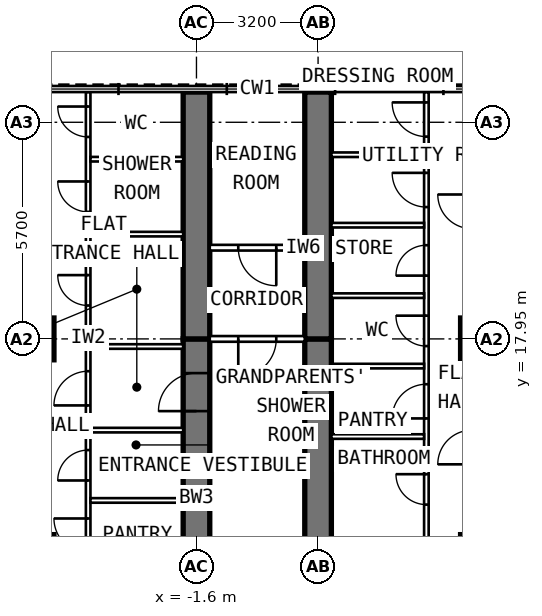
"""IFC4 building model, lengths in metres.
Left out: names, types, materials, properties, quantities, classifications, styles, units other than length and angle.
Written with IfcOpenShell. Run it as: python <this file> out.ifc"""

import sys

from ifc_helpers import new_model, si_unit, direction, frame, frame_2d, origin, origin_2d, place, context, subcontext, project, spatial, rectangle, extrude, element, fill, save


model = new_model("IFC4")
c1 = context("Model", 3, precision=1e-05, world=origin(), true_north=direction((0.0, 1.0)))
c2 = subcontext(c1, "Body", "Model", "MODEL_VIEW")
j1 = project(units=[si_unit("LENGTHUNIT", "METRE"), si_unit("PLANEANGLEUNIT", "RADIAN")], contexts=[c1])
p1 = place(None, origin())
s1 = spatial("IfcSite", under=j1, at=p1, CompositionType="ELEMENT")
p2 = place(p1, origin())
s2 = spatial("IfcBuilding", under=s1, at=p2, CompositionType="ELEMENT")
p3 = place(p2, frame((0.0, 0.0, 246.0)))
s3 = spatial("IfcBuildingStorey", under=s2, at=p3, CompositionType="ELEMENT", Elevation=246.0)
for number, where, z_axis, x_axis in (
    (1, (-5.9, 12.25, 0.0), (0.0, 0.0, 1.0), (0.0, 1.0, 0.0)),
    (2, (-5.9, 17.95, 0.0), (0.0, 0.0, 1.0), (0.0, 1.0, 0.0)),
    (3, (5.9, 12.25, 0.0), (0.0, 0.0, 1.0), (0.0, 1.0, 0.0)),
    (4, (5.9, 17.95, 0.0), (0.0, 0.0, 1.0), (0.0, 1.0, 0.0)),
):
    element("IfcColumn", number, at=place(p3, frame(where, z_axis=z_axis, x_axis=x_axis)), inside=s3, PredefinedType="COLUMN", context=c2, shape_type="SweptSolid", body=[
        extrude(rectangle(XDim=1.1, YDim=1.1, at=origin_2d()), origin(), (0.0, 0.0, 1.0), 3.6),
    ])
p4 = place(p3, frame((-1.6, 9.6, 0.0), z_axis=(0.0, 0.0, 1.0), x_axis=(0.0, 1.0, 0.0)))
e5 = element("IfcWall", 5, at=p4, inside=s3, PredefinedType="SHEAR", context=c2, shape_type="SweptSolid", body=[
    extrude(rectangle(XDim=8.35, YDim=0.7, at=frame_2d((4.175, 0.0))), origin(), (0.0, 0.0, 1.0), 3.6),
])
p5 = place(p4, frame((6.45, 0.0, 0.0)))
e6 = element("IfcOpeningElement", 6, at=p5, cuts=e5, PredefinedType="OPENING", context=c2, shape_type="SweptSolid", body=[
    extrude(rectangle(XDim=1.0, YDim=2.1, at=frame_2d((0.5, 1.05))), frame((0.0, 0.362, 0.0), z_axis=(0.0, -1.0, 0.0), x_axis=(1.0, 0.0, 0.0)), (0.0, 0.0, 1.0), 0.724),
])
p6 = place(p3, frame((-1.6, 17.95, 0.0), z_axis=(0.0, 0.0, 1.0), x_axis=(0.0, 1.0, 0.0)))
e7 = element("IfcWall", 7, at=p6, inside=s3, PredefinedType="SHEAR", context=c2, shape_type="SweptSolid", body=[
    extrude(rectangle(XDim=6.495, YDim=0.7, at=frame_2d((3.248, 0.0))), origin(), (0.0, 0.0, 1.0), 3.6),
])
p7 = place(p3, frame((1.6, 9.6, 0.0), z_axis=(0.0, 0.0, 1.0), x_axis=(0.0, 1.0, 0.0)))
e8 = element("IfcWall", 8, at=p7, inside=s3, PredefinedType="SHEAR", context=c2, shape_type="SweptSolid", body=[
    extrude(rectangle(XDim=8.35, YDim=0.7, at=frame_2d((4.175, 0.0))), origin(), (0.0, 0.0, 1.0), 3.6),
])
p8 = place(p7, frame((1.3, 0.0, 0.0)))
e9 = element("IfcOpeningElement", 9, at=p8, cuts=e8, PredefinedType="OPENING", context=c2, shape_type="SweptSolid", body=[
    extrude(rectangle(XDim=1.0, YDim=2.1, at=frame_2d((0.5, 1.05))), frame((0.0, 0.362, 0.0), z_axis=(0.0, -1.0, 0.0), x_axis=(1.0, 0.0, 0.0)), (0.0, 0.0, 1.0), 0.724),
])
p9 = place(p3, frame((1.6, 17.95, 0.0), z_axis=(0.0, 0.0, 1.0), x_axis=(0.0, 1.0, 0.0)))
e10 = element("IfcWall", 10, at=p9, inside=s3, PredefinedType="SHEAR", context=c2, shape_type="SweptSolid", body=[
    extrude(rectangle(XDim=6.495, YDim=0.7, at=frame_2d((3.248, 0.0))), origin(), (0.0, 0.0, 1.0), 3.6),
])
p10 = place(p3, frame((-4.45, 9.9, 0.0), z_axis=(0.0, 0.0, 1.0), x_axis=(0.0, 1.0, 0.0)))
e11 = element("IfcWall", 11, at=p10, inside=s3, PredefinedType="PARTITIONING", context=c2, shape_type="SweptSolid", body=[
    extrude(rectangle(XDim=14.545, YDim=0.12, at=frame_2d((7.272, 0.0))), origin(), (0.0, 0.0, 1.0), 3.35),
])
p11 = place(p10, frame((0.625, 0.0, 0.0)))
e12 = element("IfcOpeningElement", 12, at=p11, cuts=e11, PredefinedType="OPENING", context=c2, shape_type="SweptSolid", body=[
    extrude(rectangle(XDim=0.8, YDim=2.1, at=frame_2d((0.4, 1.05))), frame((0.0, 0.072, 0.0), z_axis=(0.0, -1.0, 0.0), x_axis=(1.0, 0.0, 0.0)), (0.0, 0.0, 1.0), 0.144),
])
p12 = place(p10, frame((2.425, 0.0, 0.0)))
e13 = element("IfcOpeningElement", 13, at=p12, cuts=e11, PredefinedType="OPENING", context=c2, shape_type="SweptSolid", body=[
    extrude(rectangle(XDim=0.9, YDim=2.1, at=frame_2d((0.45, 1.05))), frame((0.0, 0.072, 0.0), z_axis=(0.0, -1.0, 0.0), x_axis=(1.0, 0.0, 0.0)), (0.0, 0.0, 1.0), 0.144),
])
p13 = place(p10, frame((4.325, 0.0, 0.0)))
e14 = element("IfcOpeningElement", 14, at=p13, cuts=e11, PredefinedType="OPENING", context=c2, shape_type="SweptSolid", body=[
    extrude(rectangle(XDim=0.8, YDim=2.1, at=frame_2d((0.4, 1.05))), frame((0.0, 0.072, 0.0), z_axis=(0.0, -1.0, 0.0), x_axis=(1.0, 0.0, 0.0)), (0.0, 0.0, 1.0), 0.144),
])
p14 = place(p10, frame((6.3, 0.0, 0.0)))
e15 = element("IfcOpeningElement", 15, at=p14, cuts=e11, PredefinedType="OPENING", context=c2, shape_type="SweptSolid", body=[
    extrude(rectangle(XDim=0.9, YDim=2.1, at=frame_2d((0.45, 1.05))), frame((0.0, 0.072, 0.0), z_axis=(0.0, -1.0, 0.0), x_axis=(1.0, 0.0, 0.0)), (0.0, 0.0, 1.0), 0.144),
])
p15 = place(p10, frame((8.928, 0.0, 0.0)))
e16 = element("IfcOpeningElement", 16, at=p15, cuts=e11, PredefinedType="OPENING", context=c2, shape_type="SweptSolid", body=[
    extrude(rectangle(XDim=0.8, YDim=2.1, at=frame_2d((0.4, 1.05))), frame((0.0, 0.072, 0.0), z_axis=(0.0, -1.0, 0.0), x_axis=(1.0, 0.0, 0.0)), (0.0, 0.0, 1.0), 0.144),
])
p16 = place(p10, frame((11.393, 0.0, 0.0)))
e17 = element("IfcOpeningElement", 17, at=p16, cuts=e11, PredefinedType="OPENING", context=c2, shape_type="SweptSolid", body=[
    extrude(rectangle(XDim=0.8, YDim=2.1, at=frame_2d((0.4, 1.05))), frame((0.0, 0.072, 0.0), z_axis=(0.0, -1.0, 0.0), x_axis=(1.0, 0.0, 0.0)), (0.0, 0.0, 1.0), 0.144),
])
p17 = place(p10, frame((13.364, 0.0, 0.0)))
e18 = element("IfcOpeningElement", 18, at=p17, cuts=e11, PredefinedType="OPENING", context=c2, shape_type="SweptSolid", body=[
    extrude(rectangle(XDim=0.8, YDim=2.1, at=frame_2d((0.4, 1.05))), frame((0.0, 0.072, 0.0), z_axis=(0.0, -1.0, 0.0), x_axis=(1.0, 0.0, 0.0)), (0.0, 0.0, 1.0), 0.144),
])
for number, where, z_axis, x_axis in (
    (19, (-1.95, 13.7, 0.0), (0.0, 0.0, 1.0), (-1.0, 0.0, 0.0)),
    (20, (-1.95, 15.55, 0.0), (0.0, 0.0, 1.0), (-1.0, 0.0, 0.0)),
):
    element("IfcWall", number, at=place(p3, frame(where, z_axis=z_axis, x_axis=x_axis)), inside=s3, PredefinedType="PARTITIONING", context=c2, shape_type="SweptSolid", body=[
        extrude(rectangle(XDim=2.44, YDim=0.12, at=frame_2d((1.22, 0.0))), origin(), (0.0, 0.0, 1.0), 3.35),
    ])
p18 = place(p3, frame((-1.95, 17.75, 0.0), z_axis=(0.0, 0.0, 1.0), x_axis=(-1.0, 0.0, 0.0)))
e21 = element("IfcWall", 21, at=p18, inside=s3, PredefinedType="PARTITIONING", context=c2, shape_type="SweptSolid", body=[
    extrude(rectangle(XDim=2.44, YDim=0.12, at=frame_2d((1.22, 0.0))), origin(), (0.0, 0.0, 1.0), 2.45),
])
for number, where, z_axis, x_axis in (
    (22, (-1.95, 20.707, 0.0), (0.0, 0.0, 1.0), (-1.0, 0.0, 0.0)),
    (23, (-1.95, 22.678, 0.0), (0.0, 0.0, 1.0), (-1.0, 0.0, 0.0)),
):
    element("IfcWall", number, at=place(p3, frame(where, z_axis=z_axis, x_axis=x_axis)), inside=s3, PredefinedType="PARTITIONING", context=c2, shape_type="SweptSolid", body=[
        extrude(rectangle(XDim=2.44, YDim=0.12, at=frame_2d((1.22, 0.0))), origin(), (0.0, 0.0, 1.0), 3.35),
    ])
p19 = place(p3, frame((4.45, 9.9, 0.0), z_axis=(0.0, 0.0, 1.0), x_axis=(0.0, 1.0, 0.0)))
e24 = element("IfcWall", 24, at=p19, inside=s3, PredefinedType="PARTITIONING", context=c2, shape_type="SweptSolid", body=[
    extrude(rectangle(XDim=14.545, YDim=0.12, at=frame_2d((7.272, 0.0))), origin(), (0.0, 0.0, 1.0), 3.35),
])
p20 = place(p19, frame((0.95, 0.0, 0.0)))
e25 = element("IfcOpeningElement", 25, at=p20, cuts=e24, PredefinedType="OPENING", context=c2, shape_type="SweptSolid", body=[
    extrude(rectangle(XDim=0.9, YDim=2.1, at=frame_2d((0.45, 1.05))), frame((0.0, 0.072, 0.0), z_axis=(0.0, -1.0, 0.0), x_axis=(1.0, 0.0, 0.0)), (0.0, 0.0, 1.0), 0.144),
])
p21 = place(p19, frame((3.69, 0.0, 0.0)))
e26 = element("IfcOpeningElement", 26, at=p21, cuts=e24, PredefinedType="OPENING", context=c2, shape_type="SweptSolid", body=[
    extrude(rectangle(XDim=0.8, YDim=2.1, at=frame_2d((0.4, 1.05))), frame((0.0, 0.072, 0.0), z_axis=(0.0, -1.0, 0.0), x_axis=(1.0, 0.0, 0.0)), (0.0, 0.0, 1.0), 0.144),
])
p22 = place(p19, frame((5.958, 0.0, 0.0)))
e27 = element("IfcOpeningElement", 27, at=p22, cuts=e24, PredefinedType="OPENING", context=c2, shape_type="SweptSolid", body=[
    extrude(rectangle(XDim=0.9, YDim=2.1, at=frame_2d((0.45, 1.05))), frame((0.0, 0.072, 0.0), z_axis=(0.0, -1.0, 0.0), x_axis=(1.0, 0.0, 0.0)), (0.0, 0.0, 1.0), 0.144),
])
p23 = place(p19, frame((7.862, 0.0, 0.0)))
e28 = element("IfcOpeningElement", 28, at=p23, cuts=e24, PredefinedType="OPENING", context=c2, shape_type="SweptSolid", body=[
    extrude(rectangle(XDim=0.8, YDim=2.1, at=frame_2d((0.4, 1.05))), frame((0.0, 0.072, 0.0), z_axis=(0.0, -1.0, 0.0), x_axis=(1.0, 0.0, 0.0)), (0.0, 0.0, 1.0), 0.144),
])
p24 = place(p19, frame((9.715, 0.0, 0.0)))
e29 = element("IfcOpeningElement", 29, at=p24, cuts=e24, PredefinedType="OPENING", context=c2, shape_type="SweptSolid", body=[
    extrude(rectangle(XDim=0.8, YDim=2.1, at=frame_2d((0.4, 1.05))), frame((0.0, 0.072, 0.0), z_axis=(0.0, -1.0, 0.0), x_axis=(1.0, 0.0, 0.0)), (0.0, 0.0, 1.0), 0.144),
])
p25 = place(p19, frame((11.519, 0.0, 0.0)))
e30 = element("IfcOpeningElement", 30, at=p25, cuts=e24, PredefinedType="OPENING", context=c2, shape_type="SweptSolid", body=[
    extrude(rectangle(XDim=0.9, YDim=2.1, at=frame_2d((0.45, 1.05))), frame((0.0, 0.072, 0.0), z_axis=(0.0, -1.0, 0.0), x_axis=(1.0, 0.0, 0.0)), (0.0, 0.0, 1.0), 0.144),
])
p26 = place(p19, frame((13.373, 0.0, 0.0)))
e31 = element("IfcOpeningElement", 31, at=p26, cuts=e24, PredefinedType="OPENING", context=c2, shape_type="SweptSolid", body=[
    extrude(rectangle(XDim=0.9, YDim=2.1, at=frame_2d((0.45, 1.05))), frame((0.0, 0.072, 0.0), z_axis=(0.0, -1.0, 0.0), x_axis=(1.0, 0.0, 0.0)), (0.0, 0.0, 1.0), 0.144),
])
for number, where, z_axis, x_axis in (
    (32, (1.95, 15.381, 0.0), (0.0, 0.0, 1.0), (1.0, 0.0, 0.0)),
    (33, (1.95, 17.235, 0.0), (0.0, 0.0, 1.0), (1.0, 0.0, 0.0)),
    (34, (1.95, 19.088, 0.0), (0.0, 0.0, 1.0), (1.0, 0.0, 0.0)),
    (35, (1.95, 20.942, 0.0), (0.0, 0.0, 1.0), (1.0, 0.0, 0.0)),
    (36, (1.95, 22.796, 0.0), (0.0, 0.0, 1.0), (1.0, 0.0, 0.0)),
):
    element("IfcWall", number, at=place(p3, frame(where, z_axis=z_axis, x_axis=x_axis)), inside=s3, PredefinedType="PARTITIONING", context=c2, shape_type="SweptSolid", body=[
        extrude(rectangle(XDim=2.44, YDim=0.12, at=frame_2d((1.22, 0.0))), origin(), (0.0, 0.0, 1.0), 3.35),
    ])
p27 = place(p3, frame((1.25, 20.35, 0.0), z_axis=(0.0, 0.0, 1.0), x_axis=(-1.0, 0.0, 0.0)))
e37 = element("IfcWall", 37, at=p27, inside=s3, PredefinedType="PARTITIONING", context=c2, shape_type="SweptSolid", body=[
    extrude(rectangle(XDim=2.5, YDim=0.15, at=frame_2d((1.25, 0.0))), origin(), (0.0, 0.0, 1.0), 3.35),
])
p28 = place(p27, frame((0.75, 0.0, 0.0)))
e38 = element("IfcOpeningElement", 38, at=p28, cuts=e37, PredefinedType="OPENING", context=c2, shape_type="SweptSolid", body=[
    extrude(rectangle(XDim=1.0, YDim=2.1, at=frame_2d((0.5, 1.05))), frame((0.0, 0.087, 0.0), z_axis=(0.0, -1.0, 0.0), x_axis=(1.0, 0.0, 0.0)), (0.0, 0.0, 1.0), 0.174),
])
p29 = place(p3, frame((1.25, 17.95, 0.0), z_axis=(0.0, 0.0, 1.0), x_axis=(-1.0, 0.0, 0.0)))
e39 = element("IfcWall", 39, at=p29, inside=s3, PredefinedType="PARTITIONING", context=c2, shape_type="SweptSolid", body=[
    extrude(rectangle(XDim=2.5, YDim=0.15, at=frame_2d((1.25, 0.0))), origin(), (0.0, 0.0, 1.0), 3.35),
])
p30 = place(p29, frame((0.75, 0.0, 0.0)))
e40 = element("IfcOpeningElement", 40, at=p30, cuts=e39, PredefinedType="OPENING", context=c2, shape_type="SweptSolid", body=[
    extrude(rectangle(XDim=1.0, YDim=2.1, at=frame_2d((0.5, 1.05))), frame((0.0, 0.087, 0.0), z_axis=(0.0, -1.0, 0.0), x_axis=(1.0, 0.0, 0.0)), (0.0, 0.0, 1.0), 0.174),
])
p31 = place(p5, origin())
e41 = element("IfcDoor", 41, at=p31, inside=s3, OperationType="SINGLE_SWING_LEFT", PredefinedType="DOOR", context=c2, shape_type="SweptSolid", body=[
    extrude(rectangle(XDim=1.0, YDim=2.1, at=frame_2d((0.5, 1.05))), frame((0.0, 0.1, 0.0), z_axis=(0.0, -1.0, 0.0), x_axis=(1.0, 0.0, 0.0)), (0.0, 0.0, 1.0), 0.2),
])
fill(e6, e41)
p32 = place(p12, origin())
e42 = element("IfcDoor", 42, at=p32, inside=s3, OperationType="SINGLE_SWING_RIGHT", PredefinedType="DOOR", context=c2, shape_type="SweptSolid", body=[
    extrude(rectangle(XDim=0.9, YDim=2.1, at=frame_2d((0.45, 1.05))), frame((0.0, 0.025, 0.0), z_axis=(0.0, -1.0, 0.0), x_axis=(1.0, 0.0, 0.0)), (0.0, 0.0, 1.0), 0.05),
])
fill(e13, e42)
p33 = place(p13, origin())
e43 = element("IfcDoor", 43, at=p33, inside=s3, OperationType="SINGLE_SWING_LEFT", PredefinedType="DOOR", context=c2, shape_type="SweptSolid", body=[
    extrude(rectangle(XDim=0.8, YDim=2.1, at=frame_2d((0.4, 1.05))), frame((0.0, 0.025, 0.0), z_axis=(0.0, -1.0, 0.0), x_axis=(1.0, 0.0, 0.0)), (0.0, 0.0, 1.0), 0.05),
])
fill(e14, e43)
p34 = place(p14, origin())
e44 = element("IfcDoor", 44, at=p34, inside=s3, OperationType="SINGLE_SWING_LEFT", PredefinedType="DOOR", context=c2, shape_type="SweptSolid", body=[
    extrude(rectangle(XDim=0.9, YDim=2.1, at=frame_2d((0.45, 1.05))), frame((0.0, 0.025, 0.0), z_axis=(0.0, -1.0, 0.0), x_axis=(1.0, 0.0, 0.0)), (0.0, 0.0, 1.0), 0.05),
])
fill(e15, e44)
p35 = place(p15, origin())
e45 = element("IfcDoor", 45, at=p35, inside=s3, OperationType="SINGLE_SWING_RIGHT", PredefinedType="DOOR", context=c2, shape_type="SweptSolid", body=[
    extrude(rectangle(XDim=0.8, YDim=2.1, at=frame_2d((0.4, 1.05))), frame((0.0, 0.025, 0.0), z_axis=(0.0, -1.0, 0.0), x_axis=(1.0, 0.0, 0.0)), (0.0, 0.0, 1.0), 0.05),
])
fill(e16, e45)
p36 = place(p16, origin())
e46 = element("IfcDoor", 46, at=p36, inside=s3, OperationType="SINGLE_SWING_RIGHT", PredefinedType="DOOR", context=c2, shape_type="SweptSolid", body=[
    extrude(rectangle(XDim=0.8, YDim=2.1, at=frame_2d((0.4, 1.05))), frame((0.0, 0.025, 0.0), z_axis=(0.0, -1.0, 0.0), x_axis=(1.0, 0.0, 0.0)), (0.0, 0.0, 1.0), 0.05),
])
fill(e17, e46)
p37 = place(p17, origin())
e47 = element("IfcDoor", 47, at=p37, inside=s3, OperationType="SINGLE_SWING_RIGHT", PredefinedType="DOOR", context=c2, shape_type="SweptSolid", body=[
    extrude(rectangle(XDim=0.8, YDim=2.1, at=frame_2d((0.4, 1.05))), frame((0.0, 0.025, 0.0), z_axis=(0.0, -1.0, 0.0), x_axis=(1.0, 0.0, 0.0)), (0.0, 0.0, 1.0), 0.05),
])
fill(e18, e47)
p38 = place(p21, origin())
e48 = element("IfcDoor", 48, at=p38, inside=s3, OperationType="SINGLE_SWING_RIGHT", PredefinedType="DOOR", context=c2, shape_type="SweptSolid", body=[
    extrude(rectangle(XDim=0.8, YDim=2.1, at=frame_2d((0.4, 1.05))), frame((0.0, 0.025, 0.0), z_axis=(0.0, -1.0, 0.0), x_axis=(1.0, 0.0, 0.0)), (0.0, 0.0, 1.0), 0.05),
])
fill(e26, e48)
p39 = place(p22, origin())
e49 = element("IfcDoor", 49, at=p39, inside=s3, OperationType="SINGLE_SWING_LEFT", PredefinedType="DOOR", context=c2, shape_type="SweptSolid", body=[
    extrude(rectangle(XDim=0.9, YDim=2.1, at=frame_2d((0.45, 1.05))), frame((0.0, 0.025, 0.0), z_axis=(0.0, -1.0, 0.0), x_axis=(1.0, 0.0, 0.0)), (0.0, 0.0, 1.0), 0.05),
])
fill(e27, e49)
p40 = place(p23, origin())
e50 = element("IfcDoor", 50, at=p40, inside=s3, OperationType="SINGLE_SWING_RIGHT", PredefinedType="DOOR", context=c2, shape_type="SweptSolid", body=[
    extrude(rectangle(XDim=0.8, YDim=2.1, at=frame_2d((0.4, 1.05))), frame((0.0, 0.025, 0.0), z_axis=(0.0, -1.0, 0.0), x_axis=(1.0, 0.0, 0.0)), (0.0, 0.0, 1.0), 0.05),
])
fill(e28, e50)
p41 = place(p24, origin())
e51 = element("IfcDoor", 51, at=p41, inside=s3, OperationType="SINGLE_SWING_LEFT", PredefinedType="DOOR", context=c2, shape_type="SweptSolid", body=[
    extrude(rectangle(XDim=0.8, YDim=2.1, at=frame_2d((0.4, 1.05))), frame((0.0, 0.025, 0.0), z_axis=(0.0, -1.0, 0.0), x_axis=(1.0, 0.0, 0.0)), (0.0, 0.0, 1.0), 0.05),
])
fill(e29, e51)
p42 = place(p25, origin())
e52 = element("IfcDoor", 52, at=p42, inside=s3, OperationType="SINGLE_SWING_RIGHT", PredefinedType="DOOR", context=c2, shape_type="SweptSolid", body=[
    extrude(rectangle(XDim=0.9, YDim=2.1, at=frame_2d((0.45, 1.05))), frame((0.0, 0.025, 0.0), z_axis=(0.0, -1.0, 0.0), x_axis=(1.0, 0.0, 0.0)), (0.0, 0.0, 1.0), 0.05),
])
fill(e30, e52)
p43 = place(p26, origin())
e53 = element("IfcDoor", 53, at=p43, inside=s3, OperationType="SINGLE_SWING_RIGHT", PredefinedType="DOOR", context=c2, shape_type="SweptSolid", body=[
    extrude(rectangle(XDim=0.9, YDim=2.1, at=frame_2d((0.45, 1.05))), frame((0.0, 0.025, 0.0), z_axis=(0.0, -1.0, 0.0), x_axis=(1.0, 0.0, 0.0)), (0.0, 0.0, 1.0), 0.05),
])
fill(e31, e53)
p44 = place(p28, origin())
e54 = element("IfcDoor", 54, at=p44, inside=s3, OperationType="SINGLE_SWING_LEFT", PredefinedType="DOOR", context=c2, shape_type="SweptSolid", body=[
    extrude(rectangle(XDim=1.0, YDim=2.1, at=frame_2d((0.5, 1.05))), frame((0.0, 0.025, 0.0), z_axis=(0.0, -1.0, 0.0), x_axis=(1.0, 0.0, 0.0)), (0.0, 0.0, 1.0), 0.05),
])
fill(e38, e54)
p45 = place(p30, origin())
e55 = element("IfcDoor", 55, at=p45, inside=s3, OperationType="SINGLE_SWING_RIGHT", PredefinedType="DOOR", context=c2, shape_type="SweptSolid", body=[
    extrude(rectangle(XDim=1.0, YDim=2.1, at=frame_2d((0.5, 1.05))), frame((0.0, 0.025, 0.0), z_axis=(0.0, -1.0, 0.0), x_axis=(1.0, 0.0, 0.0)), (0.0, 0.0, 1.0), 0.05),
])
fill(e40, e55)
save(model, sys.argv[1])
